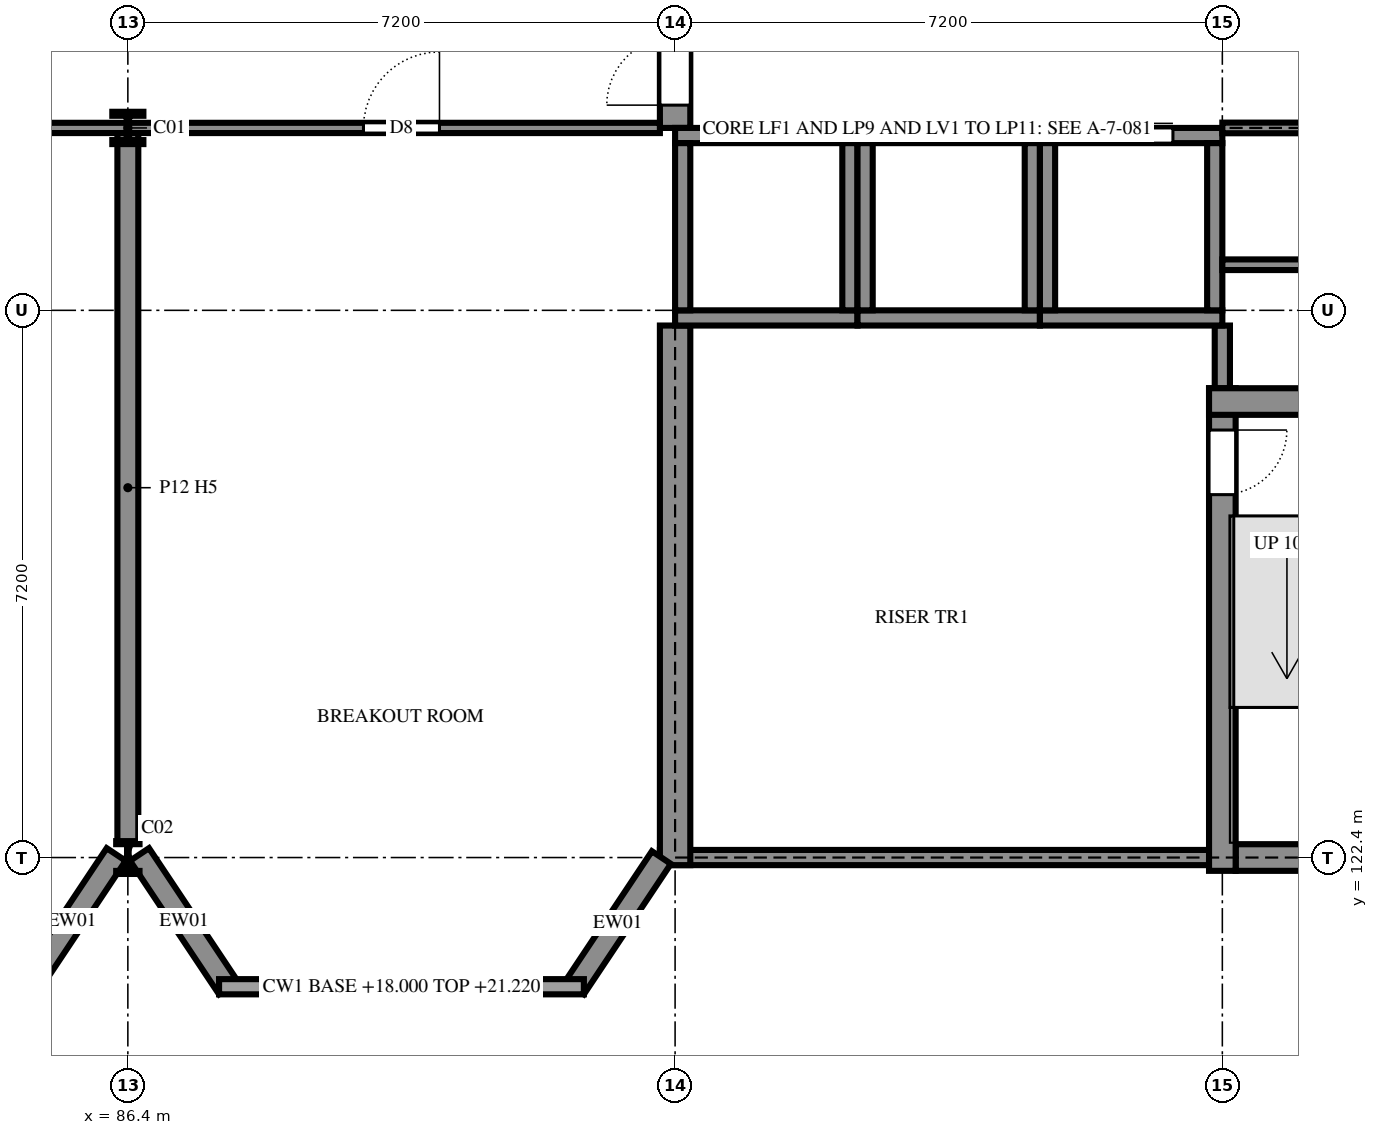
"""IFC4 building model, lengths in metres.
Left out: names, types, materials, properties, quantities, classifications, styles, units other than length and angle.
Written with IfcOpenShell. Run it as: python <this file> out.ifc"""

import sys

from ifc_helpers import new_model, si_unit, direction, frame, frame_2d, origin, origin_2d, place, context, subcontext, project, spatial, rectangle, i_section, extrude, element, fill, save


model = new_model("IFC4")
c1 = context("Model", 3, precision=1e-05, world=origin(), true_north=direction((0.0, 1.0)))
c2 = subcontext(c1, "Body", "Model", "MODEL_VIEW")
j1 = project(units=[si_unit("LENGTHUNIT", "METRE"), si_unit("PLANEANGLEUNIT", "RADIAN")], contexts=[c1])
p1 = place(None, origin())
s1 = spatial("IfcSite", under=j1, at=p1, CompositionType="ELEMENT")
p2 = place(p1, origin())
s2 = spatial("IfcBuilding", under=s1, at=p2, CompositionType="ELEMENT")
p3 = place(p2, frame((0.0, 0.0, 18.0)))
s3 = spatial("IfcBuildingStorey", under=s2, at=p3, CompositionType="ELEMENT", Elevation=18.0)
p4 = place(p3, frame((86.4, 122.4, 0.0), z_axis=(0.0, 0.0, 1.0), x_axis=(1.0, 0.0, 0.0)))
e1 = element("IfcColumn", 1, at=p4, inside=s3, PredefinedType="COLUMN", context=c2, shape_type="SweptSolid", body=[
    extrude(i_section(OverallWidth=0.307, OverallDepth=0.432, WebThickness=0.021, FlangeThickness=0.04, FilletRadius=0.027, at=origin_2d()), origin(), (0.0, 0.0, 1.0), 3.6),
])
p5 = place(p3, frame((86.4, 132.0, 0.0), z_axis=(0.0, 0.0, 1.0), x_axis=(1.0, 0.0, 0.0)))
e2 = element("IfcColumn", 2, at=p5, inside=s3, PredefinedType="COLUMN", context=c2, shape_type="SweptSolid", body=[
    extrude(i_section(OverallWidth=0.409, OverallDepth=0.425, WebThickness=0.033, FlangeThickness=0.052, FilletRadius=0.015, at=origin_2d()), origin(), (0.0, 0.0, 1.0), 3.6),
])
p6 = place(p3, frame((93.4, 122.4, 0.0), z_axis=(0.0, 0.0, 1.0), x_axis=(1.0, 0.0, 0.0)))
e3 = element("IfcWall", 3, at=p6, inside=s3, PredefinedType="SHEAR", context=c2, shape_type="SweptSolid", body=[
    extrude(rectangle(XDim=7.575, YDim=0.2, at=frame_2d((3.788, 0.0))), origin(), (0.0, 0.0, 1.0), 3.6),
])
p7 = place(p3, frame((100.975, 122.4, 0.0), z_axis=(0.0, 0.0, 1.0), x_axis=(1.0, 0.0, 0.0)))
e4 = element("IfcWall", 4, at=p7, inside=s3, PredefinedType="SHEAR", context=c2, shape_type="SweptSolid", body=[
    extrude(rectangle(XDim=3.225, YDim=0.35, at=frame_2d((1.612, 0.0))), origin(), (0.0, 0.0, 1.0), 3.6),
])
p8 = place(p7, frame((1.25, 0.0, 0.6)))
e5 = element("IfcOpeningElement", 5, at=p8, cuts=e4, PredefinedType="OPENING", context=c2, shape_type="SweptSolid", body=[
    extrude(rectangle(XDim=0.9, YDim=2.1, at=frame_2d((0.45, 1.05))), frame((0.0, 0.185, 0.0), z_axis=(0.0, -1.0, 0.0), x_axis=(1.0, 0.0, 0.0)), (0.0, 0.0, 1.0), 0.37),
])
p9 = place(p3, frame((100.8, 128.575, 0.0), z_axis=(0.0, 0.0, 1.0), x_axis=(0.0, -1.0, 0.0)))
e6 = element("IfcWall", 6, at=p9, inside=s3, PredefinedType="SHEAR", context=c2, shape_type="SweptSolid", body=[
    extrude(rectangle(XDim=6.35, YDim=0.35, at=frame_2d((3.175, 0.0))), origin(), (0.0, 0.0, 1.0), 3.6),
])
p10 = place(p9, frame((0.55, 0.0, 0.0)))
e7 = element("IfcOpeningElement", 7, at=p10, cuts=e6, PredefinedType="OPENING", context=c2, shape_type="SweptSolid", body=[
    extrude(rectangle(XDim=0.85, YDim=2.1, at=frame_2d((0.425, 1.05))), frame((0.0, 0.185, 0.0), z_axis=(0.0, -1.0, 0.0), x_axis=(1.0, 0.0, 0.0)), (0.0, 0.0, 1.0), 0.37),
])
p11 = place(p3, frame((100.8, 128.575, 0.0), z_axis=(0.0, 0.0, 1.0), x_axis=(0.0, 1.0, 0.0)))
e8 = element("IfcWall", 8, at=p11, inside=s3, PredefinedType="SHEAR", context=c2, shape_type="SweptSolid", body=[
    extrude(rectangle(XDim=0.825, YDim=0.2, at=frame_2d((0.413, 0.0))), origin(), (0.0, 0.0, 1.0), 3.6),
])
p12 = place(p3, frame((104.375, 128.4, 0.0), z_axis=(0.0, 0.0, 1.0), x_axis=(-1.0, 0.0, 0.0)))
e9 = element("IfcWall", 9, at=p12, inside=s3, PredefinedType="SHEAR", context=c2, shape_type="SweptSolid", body=[
    extrude(rectangle(XDim=3.75, YDim=0.35, at=frame_2d((1.875, 0.0))), origin(), (0.0, 0.0, 1.0), 3.6),
])
p13 = place(p12, frame((1.375, 0.0, 0.0)))
e10 = element("IfcOpeningElement", 10, at=p13, cuts=e9, PredefinedType="OPENING", context=c2, shape_type="SweptSolid", body=[
    extrude(rectangle(XDim=1.0, YDim=2.1, at=frame_2d((0.5, 1.05))), frame((0.0, 0.185, 0.0), z_axis=(0.0, -1.0, 0.0), x_axis=(1.0, 0.0, 0.0)), (0.0, 0.0, 1.0), 0.37),
])
p14 = place(p3, frame((93.6, 129.4, 0.0), z_axis=(0.0, 0.0, 1.0), x_axis=(0.0, -1.0, 0.0)))
e11 = element("IfcWall", 11, at=p14, inside=s3, PredefinedType="SHEAR", context=c2, shape_type="SweptSolid", body=[
    extrude(rectangle(XDim=7.1, YDim=0.4, at=frame_2d((3.55, 0.0))), origin(), (0.0, 0.0, 1.0), 3.6),
])
p15 = place(p3, frame((93.6, 132.0, 0.0), z_axis=(0.0, 0.0, 1.0), x_axis=(0.0, 1.0, 0.0)))
e12 = element("IfcWall", 12, at=p15, inside=s3, PredefinedType="SHEAR", context=c2, shape_type="SweptSolid", body=[
    extrude(rectangle(XDim=2.4, YDim=0.4, at=frame_2d((1.2, 0.0))), origin(), (0.0, 0.0, 1.0), 3.6),
])
p16 = place(p15, frame((0.3, 0.0, 0.0)))
e13 = element("IfcOpeningElement", 13, at=p16, cuts=e12, PredefinedType="OPENING", context=c2, shape_type="SweptSolid", body=[
    extrude(rectangle(XDim=1.8, YDim=2.1, at=frame_2d((0.9, 1.05))), frame((0.0, 0.21, 0.0), z_axis=(0.0, -1.0, 0.0), x_axis=(1.0, 0.0, 0.0)), (0.0, 0.0, 1.0), 0.42),
])
for number, where, z_axis, x_axis in (
    (14, (86.247, 122.44, 0.0), (0.0, 0.0, 1.0), (-0.555, -0.832, 0.0)),
    (15, (86.553, 122.44, 0.0), (0.0, 0.0, 1.0), (0.555, -0.832, 0.0)),
):
    element("IfcWall", number, at=place(p3, frame(where, z_axis=z_axis, x_axis=x_axis)), inside=s3, PredefinedType="SOLIDWALL", context=c2, shape_type="SweptSolid", body=[
        extrude(rectangle(XDim=2.112, YDim=0.3, at=frame_2d((1.056, 0.0))), origin(), (0.0, 0.0, 1.0), 3.22),
    ])
p17 = place(p3, frame((93.42, 122.4, 0.0), z_axis=(0.0, 0.0, 1.0), x_axis=(-0.554700196225, -0.832050294338, 0.0)))
e16 = element("IfcWall", 16, at=p17, inside=s3, PredefinedType="SOLIDWALL", context=c2, shape_type="SweptSolid", body=[
    extrude(rectangle(XDim=2.063, YDim=0.3, at=frame_2d((1.032, 0.0))), origin(), (0.0, 0.0, 1.0), 3.22),
])
p18 = place(p3, frame((93.6, 129.5, 0.0), z_axis=(0.0, 0.0, 1.0), x_axis=(1.0, 0.0, 0.0)))
e17 = element("IfcWall", 17, at=p18, inside=s3, PredefinedType="SHEAR", context=c2, shape_type="SweptSolid", body=[
    extrude(rectangle(XDim=2.4, YDim=0.2, at=frame_2d((1.2, 0.0))), origin(), (0.0, 0.0, 1.0), 3.6),
])
p19 = place(p3, frame((93.6, 131.9, 0.0), z_axis=(0.0, 0.0, 1.0), x_axis=(1.0, 0.0, 0.0)))
e18 = element("IfcWall", 18, at=p19, inside=s3, PredefinedType="SHEAR", context=c2, shape_type="SweptSolid", body=[
    extrude(rectangle(XDim=2.4, YDim=0.2, at=frame_2d((1.2, 0.0))), origin(), (0.0, 0.0, 1.0), 3.6),
])
p20 = place(p19, frame((0.65, 0.0, 0.0)))
e19 = element("IfcOpeningElement", 19, at=p20, cuts=e18, PredefinedType="OPENING", context=c2, shape_type="SweptSolid", body=[
    extrude(rectangle(XDim=1.1, YDim=2.1, at=frame_2d((0.55, 1.05))), frame((0.0, 0.11, 0.0), z_axis=(0.0, -1.0, 0.0), x_axis=(1.0, 0.0, 0.0)), (0.0, 0.0, 1.0), 0.22),
])
for number, where, z_axis, x_axis in (
    (20, (93.7, 129.6, 0.0), (0.0, 0.0, 1.0), (0.0, 1.0, 0.0)),
    (21, (95.9, 129.6, 0.0), (0.0, 0.0, 1.0), (0.0, 1.0, 0.0)),
):
    element("IfcWall", number, at=place(p3, frame(where, z_axis=z_axis, x_axis=x_axis)), inside=s3, PredefinedType="SHEAR", context=c2, shape_type="SweptSolid", body=[
        extrude(rectangle(XDim=2.2, YDim=0.2, at=frame_2d((1.1, 0.0))), origin(), (0.0, 0.0, 1.0), 3.6),
    ])
p21 = place(p3, frame((96.0, 129.5, 0.0), z_axis=(0.0, 0.0, 1.0), x_axis=(1.0, 0.0, 0.0)))
e22 = element("IfcWall", 22, at=p21, inside=s3, PredefinedType="SHEAR", context=c2, shape_type="SweptSolid", body=[
    extrude(rectangle(XDim=2.4, YDim=0.2, at=frame_2d((1.2, 0.0))), origin(), (0.0, 0.0, 1.0), 3.6),
])
p22 = place(p3, frame((96.0, 131.9, 0.0), z_axis=(0.0, 0.0, 1.0), x_axis=(1.0, 0.0, 0.0)))
e23 = element("IfcWall", 23, at=p22, inside=s3, PredefinedType="SHEAR", context=c2, shape_type="SweptSolid", body=[
    extrude(rectangle(XDim=2.4, YDim=0.2, at=frame_2d((1.2, 0.0))), origin(), (0.0, 0.0, 1.0), 3.6),
])
p23 = place(p22, frame((0.65, 0.0, 0.0)))
e24 = element("IfcOpeningElement", 24, at=p23, cuts=e23, PredefinedType="OPENING", context=c2, shape_type="SweptSolid", body=[
    extrude(rectangle(XDim=1.1, YDim=2.1, at=frame_2d((0.55, 1.05))), frame((0.0, 0.11, 0.0), z_axis=(0.0, -1.0, 0.0), x_axis=(1.0, 0.0, 0.0)), (0.0, 0.0, 1.0), 0.22),
])
for number, where, z_axis, x_axis in (
    (25, (96.1, 129.6, 0.0), (0.0, 0.0, 1.0), (0.0, 1.0, 0.0)),
    (26, (98.3, 129.6, 0.0), (0.0, 0.0, 1.0), (0.0, 1.0, 0.0)),
):
    element("IfcWall", number, at=place(p3, frame(where, z_axis=z_axis, x_axis=x_axis)), inside=s3, PredefinedType="SHEAR", context=c2, shape_type="SweptSolid", body=[
        extrude(rectangle(XDim=2.2, YDim=0.2, at=frame_2d((1.1, 0.0))), origin(), (0.0, 0.0, 1.0), 3.6),
    ])
p24 = place(p3, frame((98.4, 129.5, 0.0), z_axis=(0.0, 0.0, 1.0), x_axis=(1.0, 0.0, 0.0)))
e27 = element("IfcWall", 27, at=p24, inside=s3, PredefinedType="SHEAR", context=c2, shape_type="SweptSolid", body=[
    extrude(rectangle(XDim=2.4, YDim=0.2, at=frame_2d((1.2, 0.0))), origin(), (0.0, 0.0, 1.0), 3.6),
])
p25 = place(p3, frame((98.4, 131.9, 0.0), z_axis=(0.0, 0.0, 1.0), x_axis=(1.0, 0.0, 0.0)))
e28 = element("IfcWall", 28, at=p25, inside=s3, PredefinedType="SHEAR", context=c2, shape_type="SweptSolid", body=[
    extrude(rectangle(XDim=2.4, YDim=0.2, at=frame_2d((1.2, 0.0))), origin(), (0.0, 0.0, 1.0), 3.6),
])
p26 = place(p25, frame((0.65, 0.0, 0.0)))
e29 = element("IfcOpeningElement", 29, at=p26, cuts=e28, PredefinedType="OPENING", context=c2, shape_type="SweptSolid", body=[
    extrude(rectangle(XDim=1.1, YDim=2.1, at=frame_2d((0.55, 1.05))), frame((0.0, 0.11, 0.0), z_axis=(0.0, -1.0, 0.0), x_axis=(1.0, 0.0, 0.0)), (0.0, 0.0, 1.0), 0.22),
])
for number, where, z_axis, x_axis in (
    (30, (98.5, 129.6, 0.0), (0.0, 0.0, 1.0), (0.0, 1.0, 0.0)),
    (31, (100.7, 129.6, 0.0), (0.0, 0.0, 1.0), (0.0, 1.0, 0.0)),
):
    element("IfcWall", number, at=place(p3, frame(where, z_axis=z_axis, x_axis=x_axis)), inside=s3, PredefinedType="SHEAR", context=c2, shape_type="SweptSolid", body=[
        extrude(rectangle(XDim=2.2, YDim=0.2, at=frame_2d((1.1, 0.0))), origin(), (0.0, 0.0, 1.0), 3.6),
    ])
p27 = place(p3, frame((100.8, 130.2, 0.0), z_axis=(0.0, 0.0, 1.0), x_axis=(1.0, 0.0, 0.0)))
e32 = element("IfcWall", 32, at=p27, inside=s3, PredefinedType="PARTITIONING", context=c2, shape_type="SweptSolid", body=[
    extrude(rectangle(XDim=3.3, YDim=0.14, at=frame_2d((1.65, 0.0))), origin(), (0.0, 0.0, 1.0), 3.46),
])
p28 = place(p27, frame((1.2, 0.0, 0.0)))
e33 = element("IfcOpeningElement", 33, at=p28, cuts=e32, PredefinedType="OPENING", context=c2, shape_type="SweptSolid", body=[
    extrude(rectangle(XDim=1.0, YDim=2.1, at=frame_2d((0.5, 1.05))), frame((0.0, 0.08, 0.0), z_axis=(0.0, -1.0, 0.0), x_axis=(1.0, 0.0, 0.0)), (0.0, 0.0, 1.0), 0.16),
])
p29 = place(p3, frame((64.97, 132.0, 0.0), z_axis=(0.0, 0.0, 1.0), x_axis=(1.0, 0.0, 0.0)))
e34 = element("IfcWall", 34, at=p29, inside=s3, PredefinedType="PARTITIONING", context=c2, shape_type="SweptSolid", body=[
    extrude(rectangle(XDim=28.43, YDim=0.135, at=frame_2d((14.215, 0.0))), origin(), (0.0, 0.0, 1.0), 3.16),
])
p30 = place(p29, frame((1.205, 0.0, 0.0)))
e35 = element("IfcOpeningElement", 35, at=p30, cuts=e34, PredefinedType="OPENING", context=c2, shape_type="SweptSolid", body=[
    extrude(rectangle(XDim=0.85, YDim=2.1, at=frame_2d((0.425, 1.05))), frame((0.0, 0.077, 0.0), z_axis=(0.0, -1.0, 0.0), x_axis=(1.0, 0.0, 0.0)), (0.0, 0.0, 1.0), 0.155),
])
p31 = place(p29, frame((11.83, 0.0, 0.0)))
e36 = element("IfcOpeningElement", 36, at=p31, cuts=e34, PredefinedType="OPENING", context=c2, shape_type="SweptSolid", body=[
    extrude(rectangle(XDim=1.8, YDim=2.1, at=frame_2d((0.9, 1.05))), frame((0.0, 0.077, 0.0), z_axis=(0.0, -1.0, 0.0), x_axis=(1.0, 0.0, 0.0)), (0.0, 0.0, 1.0), 0.155),
])
p32 = place(p29, frame((24.53, 0.0, 0.0)))
e37 = element("IfcOpeningElement", 37, at=p32, cuts=e34, PredefinedType="OPENING", context=c2, shape_type="SweptSolid", body=[
    extrude(rectangle(XDim=1.0, YDim=2.4, at=frame_2d((0.5, 1.2))), frame((0.0, 0.077, 0.0), z_axis=(0.0, -1.0, 0.0), x_axis=(1.0, 0.0, 0.0)), (0.0, 0.0, 1.0), 0.155),
])
p33 = place(p29, frame((4.73, 0.0, 0.0)))
e38 = element("IfcOpeningElement", 38, at=p33, cuts=e34, PredefinedType="OPENING", context=c2, shape_type="SweptSolid", body=[
    extrude(rectangle(XDim=1.0, YDim=2.4, at=frame_2d((0.5, 1.2))), frame((0.0, 0.077, 0.0), z_axis=(0.0, -1.0, 0.0), x_axis=(1.0, 0.0, 0.0)), (0.0, 0.0, 1.0), 0.155),
])
p34 = place(p3, frame((100.8, 132.0, 0.0), z_axis=(0.0, 0.0, 1.0), x_axis=(1.0, 0.0, 0.0)))
e39 = element("IfcWall", 39, at=p34, inside=s3, PredefinedType="PARTITIONING", context=c2, shape_type="SweptSolid", body=[
    extrude(rectangle(XDim=3.3, YDim=0.14, at=frame_2d((1.65, 0.0))), origin(), (0.0, 0.0, 1.0), 3.46),
])
p35 = place(p34, frame((1.2, 0.0, 0.0)))
e40 = element("IfcOpeningElement", 40, at=p35, cuts=e39, PredefinedType="OPENING", context=c2, shape_type="SweptSolid", body=[
    extrude(rectangle(XDim=1.0, YDim=2.1, at=frame_2d((0.5, 1.05))), frame((0.0, 0.08, 0.0), z_axis=(0.0, -1.0, 0.0), x_axis=(1.0, 0.0, 0.0)), (0.0, 0.0, 1.0), 0.16),
])
p36 = place(p3, frame((86.4, 122.6, 0.0), z_axis=(0.0, 0.0, 1.0), x_axis=(0.0, 1.0, 0.0)))
e41 = element("IfcWall", 41, at=p36, inside=s3, PredefinedType="PARTITIONING", context=c2, shape_type="SweptSolid", body=[
    extrude(rectangle(XDim=9.333, YDim=0.275, at=frame_2d((4.666, 0.0))), origin(), (0.0, 0.0, 1.0), 3.06),
])
p37 = place(p20, origin())
e42 = element("IfcDoor", 42, at=p37, inside=s3, OperationType="SLIDING_TO_LEFT", PredefinedType="DOOR", context=c2, shape_type="SweptSolid", body=[
    extrude(rectangle(XDim=1.1, YDim=2.1, at=frame_2d((0.55, 1.05))), frame((0.0, 0.025, 0.0), z_axis=(0.0, -1.0, 0.0), x_axis=(1.0, 0.0, 0.0)), (0.0, 0.0, 1.0), 0.05),
])
fill(e19, e42)
p38 = place(p23, origin())
e43 = element("IfcDoor", 43, at=p38, inside=s3, OperationType="SLIDING_TO_LEFT", PredefinedType="DOOR", context=c2, shape_type="SweptSolid", body=[
    extrude(rectangle(XDim=1.1, YDim=2.1, at=frame_2d((0.55, 1.05))), frame((0.0, 0.025, 0.0), z_axis=(0.0, -1.0, 0.0), x_axis=(1.0, 0.0, 0.0)), (0.0, 0.0, 1.0), 0.05),
])
fill(e24, e43)
p39 = place(p26, origin())
e44 = element("IfcDoor", 44, at=p39, inside=s3, OperationType="SLIDING_TO_LEFT", PredefinedType="DOOR", context=c2, shape_type="SweptSolid", body=[
    extrude(rectangle(XDim=1.1, YDim=2.1, at=frame_2d((0.55, 1.05))), frame((0.0, 0.025, 0.0), z_axis=(0.0, -1.0, 0.0), x_axis=(1.0, 0.0, 0.0)), (0.0, 0.0, 1.0), 0.05),
])
fill(e29, e44)
p40 = place(p32, origin())
e45 = element("IfcDoor", 45, at=p40, inside=s3, OperationType="SINGLE_SWING_LEFT", PredefinedType="DOOR", context=c2, shape_type="SweptSolid", body=[
    extrude(rectangle(XDim=1.0, YDim=2.4, at=frame_2d((0.5, 1.2))), frame((0.0, 0.025, 0.0), z_axis=(0.0, -1.0, 0.0), x_axis=(1.0, 0.0, 0.0)), (0.0, 0.0, 1.0), 0.05),
])
fill(e37, e45)
p41 = place(p10, origin())
e46 = element("IfcDoor", 46, at=p41, inside=s3, OperationType="SINGLE_SWING_RIGHT", PredefinedType="DOOR", context=c2, shape_type="SweptSolid", body=[
    extrude(rectangle(XDim=0.85, YDim=2.1, at=frame_2d((0.425, 1.05))), frame((0.0, 0.025, 0.0), z_axis=(0.0, -1.0, 0.0), x_axis=(1.0, 0.0, 0.0)), (0.0, 0.0, 1.0), 0.05),
])
fill(e7, e46)
p42 = place(p16, origin())
e47 = element("IfcDoor", 47, at=p42, inside=s3, OperationType="DOUBLE_DOOR_SINGLE_SWING", PredefinedType="DOOR", context=c2, shape_type="SweptSolid", body=[
    extrude(rectangle(XDim=1.8, YDim=2.1, at=frame_2d((0.9, 1.05))), frame((0.0, 0.025, 0.0), z_axis=(0.0, -1.0, 0.0), x_axis=(1.0, 0.0, 0.0)), (0.0, 0.0, 1.0), 0.05),
])
fill(e13, e47)
save(model, sys.argv[1])
